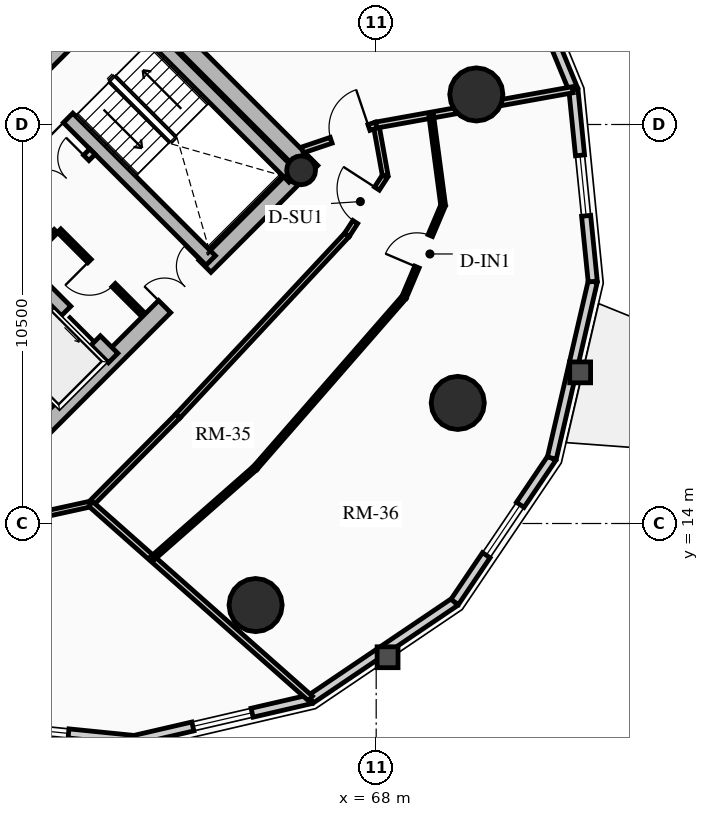
"""IFC4 building model, lengths in metres.
Left out: names, types, materials, properties, quantities, classifications, styles, units other than length and angle.
Written with IfcOpenShell. Run it as: python <this file> out.ifc"""

import sys

from ifc_helpers import new_model, si_unit, direction, frame, frame_2d, origin, origin_2d, place, context, subcontext, project, spatial, rectangle, circle, hollow_circle, extrude, source, transform, mapped, element, fill, save


model = new_model("IFC4")
c1 = context("Model", 3, precision=1e-05, world=origin(), true_north=direction((0.0, 1.0)))
c2 = subcontext(c1, "Body", "Model", "MODEL_VIEW")
j1 = project(units=[si_unit("LENGTHUNIT", "METRE"), si_unit("PLANEANGLEUNIT", "RADIAN")], contexts=[c1])
p1 = place(None, origin())
s1 = spatial("IfcSite", under=j1, at=p1, CompositionType="ELEMENT")
p2 = place(p1, origin())
s2 = spatial("IfcBuilding", under=s1, at=p2, CompositionType="ELEMENT")
p3 = place(p2, frame((0.0, 0.0, 144.04)))
s3 = spatial("IfcBuildingStorey", under=s2, at=p3, CompositionType="ELEMENT", Elevation=144.04)
p4 = place(p3, frame((66.303, 23.263, 0.0), z_axis=(0.0, 0.0, 1.0), x_axis=(-0.707106781187, 0.707106781187, 0.0)))
e1 = element("IfcWall", 1, at=p4, inside=s3, PredefinedType="SHEAR", context=c2, shape_type="SweptSolid", body=[
    extrude(rectangle(XDim=14.2, YDim=0.45, at=frame_2d((7.1, 0.0))), origin(), (0.0, 0.0, 1.0), 3.06),
])
p5 = place(p3, frame((58.578, 15.856, 0.0), z_axis=(0.0, 0.0, 1.0), x_axis=(0.707106781187, 0.707106781187, 0.0)))
e2 = element("IfcWall", 2, at=p5, inside=s3, PredefinedType="SHEAR", context=c2, shape_type="SweptSolid", body=[
    extrude(rectangle(XDim=10.7, YDim=0.45, at=frame_2d((5.35, 0.0))), origin(), (0.0, 0.0, 1.0), 3.06),
])
m1 = source(origin(), c2, "Body", "SweptSolid", [
    extrude(rectangle(XDim=1.5, YDim=2.02, at=frame_2d((0.75, 1.01))), frame((0.0, 0.235, 0.0), z_axis=(0.0, -1.0, 0.0), x_axis=(1.0, 0.0, 0.0)), (0.0, 0.0, 1.0), 0.47),
])
p6 = place(p5, frame((5.45, 0.0, 0.0)))
e3 = element("IfcOpeningElement", 3, at=p6, cuts=e2, PredefinedType="OPENING", context=c2, shape_type="MappedRepresentation", body=[
    mapped(m1, transform((0.0, 0.0, 0.0), x_axis=(1.0, 0.0, 0.0), y_axis=(0.0, 1.0, 0.0), z_axis=(0.0, 0.0, 1.0), scale=1.0)),
])
p7 = place(p3, frame((61.078, 18.355, 0.0), z_axis=(0.0, 0.0, 1.0), x_axis=(-0.707106781187, 0.707106781187, 0.0)))
e4 = element("IfcWall", 4, at=p7, inside=s3, PredefinedType="SHEAR", context=c2, shape_type="SweptSolid", body=[
    extrude(rectangle(XDim=13.75, YDim=0.35, at=frame_2d((6.875, 0.0))), origin(), (0.0, 0.0, 1.0), 3.06),
])
m2 = source(origin(), c2, "Body", "SweptSolid", [
    extrude(rectangle(XDim=1.1, YDim=2.015, at=frame_2d((0.55, 1.007))), frame((0.0, 0.185, 0.0), z_axis=(0.0, -1.0, 0.0), x_axis=(1.0, 0.0, 0.0)), (0.0, 0.0, 1.0), 0.37),
])
p8 = place(p7, frame((4.875, 0.0, 0.0)))
e5 = element("IfcOpeningElement", 5, at=p8, cuts=e4, PredefinedType="OPENING", context=c2, shape_type="MappedRepresentation", body=[
    mapped(m2, transform((0.0, 0.0, 0.0), x_axis=(1.0, 0.0, 0.0), y_axis=(0.0, 1.0, 0.0), z_axis=(0.0, 0.0, 1.0), scale=1.0)),
])
p9 = place(p7, frame((0.65, 0.0, 0.0)))
e6 = element("IfcOpeningElement", 6, at=p9, cuts=e4, PredefinedType="OPENING", context=c2, shape_type="MappedRepresentation", body=[
    mapped(m2, transform((0.0, 0.0, 0.0), x_axis=(1.0, 0.0, 0.0), y_axis=(0.0, 1.0, 0.0), z_axis=(0.0, 0.0, 1.0), scale=1.0)),
])
p10 = place(p7, frame((2.65, 0.0, 0.0)))
e7 = element("IfcOpeningElement", 7, at=p10, cuts=e4, PredefinedType="OPENING", context=c2, shape_type="MappedRepresentation", body=[
    mapped(m2, transform((0.0, 0.0, 0.0), x_axis=(1.0, 0.0, 0.0), y_axis=(0.0, 1.0, 0.0), z_axis=(0.0, 0.0, 1.0), scale=1.0)),
])
m3 = source(origin(), c2, "Body", "SweptSolid", [
    extrude(rectangle(XDim=1.15, YDim=2.02, at=frame_2d((0.575, 1.01))), frame((0.0, 0.185, 0.0), z_axis=(0.0, -1.0, 0.0), x_axis=(1.0, 0.0, 0.0)), (0.0, 0.0, 1.0), 0.37),
])
p11 = place(p7, frame((7.295, 0.0, 0.0)))
e8 = element("IfcOpeningElement", 8, at=p11, cuts=e4, PredefinedType="OPENING", context=c2, shape_type="MappedRepresentation", body=[
    mapped(m3, transform((0.0, 0.0, 0.0), x_axis=(1.0, 0.0, 0.0), y_axis=(0.0, 1.0, 0.0), z_axis=(0.0, 0.0, 1.0), scale=1.0)),
])
p12 = place(p3, frame((63.645, 20.922, 0.0), z_axis=(0.0, 0.0, 1.0), x_axis=(-0.70711946392, 0.707094098226, 0.0)))
e9 = element("IfcWall", 9, at=p12, inside=s3, PredefinedType="SHEAR", context=c2, shape_type="SweptSolid", body=[
    extrude(rectangle(XDim=9.625, YDim=0.35, at=frame_2d((4.812, 0.0))), origin(), (0.0, 0.0, 1.0), 3.06),
])
p13 = place(p12, frame((5.305, 0.0, 0.0)))
e10 = element("IfcOpeningElement", 10, at=p13, cuts=e9, PredefinedType="OPENING", context=c2, shape_type="MappedRepresentation", body=[
    mapped(m3, transform((0.0, 0.0, 0.0), x_axis=(1.0, 0.0, 0.0), y_axis=(0.0, 1.0, 0.0), z_axis=(0.0, 0.0, 1.0), scale=1.0)),
])
p14 = place(p3, frame((65.83, 23.107, 0.0), z_axis=(0.0, 0.0, 1.0), x_axis=(-0.707088616009, 0.707124945897, 0.0)))
e11 = element("IfcWall", 11, at=p14, inside=s3, PredefinedType="SHEAR", context=c2, shape_type="SweptSolid", body=[
    extrude(rectangle(XDim=6.72, YDim=0.35, at=frame_2d((3.36, 0.0))), origin(), (0.0, 0.0, 1.0), 3.06),
])
p15 = place(p3, frame((58.893, 25.674, 0.0), z_axis=(0.0, 0.0, 1.0), x_axis=(0.707106781187, 0.707106781187, 0.0)))
e12 = element("IfcWall", 12, at=p15, inside=s3, PredefinedType="SHEAR", context=c2, shape_type="SweptSolid", body=[
    extrude(rectangle(XDim=3.285, YDim=0.35, at=frame_2d((1.643, 0.0))), origin(), (0.0, 0.0, 1.0), 3.06),
])
p16 = place(p3, frame((66.024, 23.294, 0.0), z_axis=(0.0, 0.0, 1.0), x_axis=(0.707106781187, 0.707106781187, 0.0)))
e13 = element("IfcColumn", 13, at=p16, inside=s3, PredefinedType="COLUMN", context=c2, shape_type="SweptSolid", body=[
    extrude(hollow_circle(Radius=0.38, WallThickness=0.032, at=origin_2d()), origin(), (0.0, 0.0, 1.0), 3.06),
])
for number, where, z_axis, x_axis in (
    (14, (64.827, 11.854, 0.0), (0.0, 0.0, 1.0), (1.0, 0.0, 0.0)),
    (15, (70.146, 17.173, 0.0), (0.0, 0.0, 1.0), (1.0, 0.0, 0.0)),
    (16, (70.635, 25.291, 0.0), (0.0, 0.0, 1.0), (1.0, 0.0, 0.0)),
):
    element("IfcColumn", number, at=place(p3, frame(where, z_axis=z_axis, x_axis=x_axis)), inside=s3, PredefinedType="USERDEFINED", context=c2, shape_type="SweptSolid", body=[
        extrude(circle(Radius=0.7, at=origin_2d()), origin(), (0.0, 0.0, 1.0), 3.06),
    ])
p17 = place(p3, frame((61.633, 8.302, 0.0), z_axis=(0.0, 0.0, 1.0), x_axis=(-0.994959267396, 0.100279889424, 0.0)))
e17 = element("IfcWall", 17, at=p17, inside=s3, PredefinedType="SOLIDWALL", context=c2, shape_type="SweptSolid", body=[
    extrude(rectangle(XDim=5.076, YDim=0.24, at=frame_2d((2.538, 0.0))), origin(), (0.0, 0.0, 1.0), 2.229),
])
m4 = source(origin(), c2, "Body", "SweptSolid", [
    extrude(rectangle(XDim=1.6, YDim=1.3, at=frame_2d((0.8, 0.65))), frame((0.0, 0.13, 0.0), z_axis=(0.0, -1.0, 0.0), x_axis=(1.0, 0.0, 0.0)), (0.0, 0.0, 1.0), 0.26),
])
p18 = place(p17, frame((1.738, 0.0, 0.65)))
e18 = element("IfcOpeningElement", 18, at=p18, cuts=e17, PredefinedType="OPENING", context=c2, shape_type="MappedRepresentation", body=[
    mapped(m4, transform((0.0, 0.0, 0.0), x_axis=(1.0, 0.0, 0.0), y_axis=(0.0, 1.0, 0.0), z_axis=(0.0, 0.0, 1.0), scale=1.0)),
])
p19 = place(p3, frame((66.279, 9.378, 0.0), z_axis=(0.0, 0.0, 1.0), x_axis=(-0.974206226622, -0.225659540039, 0.0)))
e19 = element("IfcWall", 19, at=p19, inside=s3, PredefinedType="SOLIDWALL", context=c2, shape_type="SweptSolid", body=[
    extrude(rectangle(XDim=4.769, YDim=0.24, at=frame_2d((2.385, 0.0))), origin(), (0.0, 0.0, 1.0), 2.229),
])
p20 = place(p19, frame((1.585, 0.0, 0.65)))
e20 = element("IfcOpeningElement", 20, at=p20, cuts=e19, PredefinedType="OPENING", context=c2, shape_type="MappedRepresentation", body=[
    mapped(m4, transform((0.0, 0.0, 0.0), x_axis=(1.0, 0.0, 0.0), y_axis=(0.0, 1.0, 0.0), z_axis=(0.0, 0.0, 1.0), scale=1.0)),
])
p21 = place(p3, frame((70.065, 11.935, 0.0), z_axis=(0.0, 0.0, 1.0), x_axis=(-0.828739009952, -0.559635286042, 0.0)))
e21 = element("IfcWall", 21, at=p21, inside=s3, PredefinedType="SOLIDWALL", context=c2, shape_type="SweptSolid", body=[
    extrude(rectangle(XDim=4.569, YDim=0.24, at=frame_2d((2.284, 0.0))), origin(), (0.0, 0.0, 1.0), 2.229),
])
p22 = place(p3, frame((72.622, 15.721, 0.0), z_axis=(0.0, 0.0, 1.0), x_axis=(-0.559635286042, -0.828739009952, 0.0)))
e22 = element("IfcWall", 22, at=p22, inside=s3, PredefinedType="SOLIDWALL", context=c2, shape_type="SweptSolid", body=[
    extrude(rectangle(XDim=4.569, YDim=0.24, at=frame_2d((2.284, 0.0))), origin(), (0.0, 0.0, 1.0), 2.229),
])
p23 = place(p22, frame((1.484, 0.0, 0.65)))
e23 = element("IfcOpeningElement", 23, at=p23, cuts=e22, PredefinedType="OPENING", context=c2, shape_type="MappedRepresentation", body=[
    mapped(m4, transform((0.0, 0.0, 0.0), x_axis=(1.0, 0.0, 0.0), y_axis=(0.0, 1.0, 0.0), z_axis=(0.0, 0.0, 1.0), scale=1.0)),
])
p24 = place(p3, frame((73.698, 20.367, 0.0), z_axis=(0.0, 0.0, 1.0), x_axis=(-0.225659540039, -0.974206226622, 0.0)))
e24 = element("IfcWall", 24, at=p24, inside=s3, PredefinedType="SOLIDWALL", context=c2, shape_type="SweptSolid", body=[
    extrude(rectangle(XDim=4.769, YDim=0.24, at=frame_2d((2.385, 0.0))), origin(), (0.0, 0.0, 1.0), 2.229),
])
p25 = place(p3, frame((73.189, 25.418, 0.0), z_axis=(0.0, 0.0, 1.0), x_axis=(0.100279889424, -0.994959267396, 0.0)))
e25 = element("IfcWall", 25, at=p25, inside=s3, PredefinedType="SOLIDWALL", context=c2, shape_type="SweptSolid", body=[
    extrude(rectangle(XDim=5.076, YDim=0.24, at=frame_2d((2.538, 0.0))), origin(), (0.0, 0.0, 1.0), 2.229),
])
p26 = place(p25, frame((1.738, 0.0, 0.65)))
e26 = element("IfcOpeningElement", 26, at=p26, cuts=e25, PredefinedType="OPENING", context=c2, shape_type="MappedRepresentation", body=[
    mapped(m4, transform((0.0, 0.0, 0.0), x_axis=(1.0, 0.0, 0.0), y_axis=(0.0, 1.0, 0.0), z_axis=(0.0, 0.0, 1.0), scale=1.0)),
])
p27 = place(p3, frame((71.144, 30.378, 0.0), z_axis=(0.0, 0.0, 1.0), x_axis=(0.38111364655, -0.924528197738, 0.0)))
e27 = element("IfcWall", 27, at=p27, inside=s3, PredefinedType="SOLIDWALL", context=c2, shape_type="SweptSolid", body=[
    extrude(rectangle(XDim=5.366, YDim=0.24, at=frame_2d((2.683, 0.0))), origin(), (0.0, 0.0, 1.0), 2.229),
])
p28 = place(p3, frame((58.214, 21.467, 0.0), z_axis=(0.0, 0.0, 1.0), x_axis=(0.707106781187, 0.707106781187, 0.0)))
e28 = element("IfcWall", 28, at=p28, inside=s3, PredefinedType="PARTITIONING", context=c2, shape_type="SweptSolid", body=[
    extrude(rectangle(XDim=3.28, YDim=0.2, at=frame_2d((1.64, 0.0))), origin(), (0.0, 0.0, 1.0), 2.705),
])
m5 = source(origin(), c2, "Body", "SweptSolid", [
    extrude(rectangle(XDim=1.5, YDim=2.02, at=frame_2d((0.75, 1.01))), frame((0.0, 0.11, 0.0), z_axis=(0.0, -1.0, 0.0), x_axis=(1.0, 0.0, 0.0)), (0.0, 0.0, 1.0), 0.22),
])
p29 = place(p28, frame((1.55, 0.0, 0.0)))
e29 = element("IfcOpeningElement", 29, at=p29, cuts=e28, PredefinedType="OPENING", context=c2, shape_type="MappedRepresentation", body=[
    mapped(m5, transform((0.0, 0.0, 0.0), x_axis=(1.0, 0.0, 0.0), y_axis=(0.0, 1.0, 0.0), z_axis=(0.0, 0.0, 1.0), scale=1.0)),
])
p30 = place(p3, frame((61.835, 19.529, 0.0), z_axis=(0.0, 0.0, 1.0), x_axis=(-0.707146413884, 0.707067146267, 0.0)))
e30 = element("IfcWall", 30, at=p30, inside=s3, PredefinedType="PARTITIONING", context=c2, shape_type="SweptSolid", body=[
    extrude(rectangle(XDim=3.08, YDim=0.125, at=frame_2d((1.54, 0.0))), origin(), (0.0, 0.0, 1.0), 2.705),
])
m6 = source(origin(), c2, "Body", "SweptSolid", [
    extrude(rectangle(XDim=0.9, YDim=2.005, at=frame_2d((0.45, 1.002))), frame((0.0, 0.073, 0.0), z_axis=(0.0, -1.0, 0.0), x_axis=(1.0, 0.0, 0.0)), (0.0, 0.0, 1.0), 0.145),
])
p31 = place(p30, frame((1.05, 0.0, 0.0)))
e31 = element("IfcOpeningElement", 31, at=p31, cuts=e30, PredefinedType="OPENING", context=c2, shape_type="MappedRepresentation", body=[
    mapped(m6, transform((0.0, 0.0, 0.0), x_axis=(1.0, 0.0, 0.0), y_axis=(0.0, 1.0, 0.0), z_axis=(0.0, 0.0, 1.0), scale=1.0)),
])
p32 = place(p3, frame((58.794, 20.915, 0.0), z_axis=(0.0, 0.0, 1.0), x_axis=(0.707106781187, 0.707106781187, 0.0)))
e32 = element("IfcWall", 32, at=p32, inside=s3, PredefinedType="PARTITIONING", context=c2, shape_type="SweptSolid", body=[
    extrude(rectangle(XDim=1.1, YDim=0.125, at=frame_2d((0.55, 0.0))), origin(), (0.0, 0.0, 1.0), 2.705),
])
p33 = place(p3, frame((58.963, 14.18, 0.0), z_axis=(0.0, 0.0, 1.0), x_axis=(0.976826524015, 0.214032572243, 0.0)))
e33 = element("IfcWall", 33, at=p33, inside=s3, PredefinedType="PARTITIONING", context=c2, shape_type="SweptSolid", body=[
    extrude(rectangle(XDim=1.562, YDim=0.15, at=frame_2d((0.781, 0.0))), origin(), (0.0, 0.0, 1.0), 2.275),
])
p34 = place(p3, frame((60.488, 14.514, 0.0), z_axis=(0.0, 0.0, 1.0), x_axis=(0.703880260405, 0.71031864611, 0.0)))
e34 = element("IfcWall", 34, at=p34, inside=s3, PredefinedType="PARTITIONING", context=c2, shape_type="SweptSolid", body=[
    extrude(rectangle(XDim=3.261, YDim=0.15, at=frame_2d((1.63, 0.0))), origin(), (0.0, 0.0, 1.0), 2.275),
])
p35 = place(p3, frame((62.784, 16.83, 0.0), z_axis=(0.0, 0.0, 1.0), x_axis=(0.682240832942, 0.731127516831, 0.0)))
e35 = element("IfcWall", 35, at=p35, inside=s3, PredefinedType="PARTITIONING", context=c2, shape_type="SweptSolid", body=[
    extrude(rectangle(XDim=6.517, YDim=0.15, at=frame_2d((3.259, 0.0))), origin(), (0.0, 0.0, 1.0), 2.275),
])
p36 = place(p3, frame((67.23, 21.595, 0.0), z_axis=(0.0, 0.0, 1.0), x_axis=(0.543687770222, 0.839287560084, 0.0)))
e36 = element("IfcWall", 36, at=p36, inside=s3, PredefinedType="PARTITIONING", context=c2, shape_type="SweptSolid", body=[
    extrude(rectangle(XDim=1.855, YDim=0.15, at=frame_2d((0.927, 0.0))), origin(), (0.0, 0.0, 1.0), 2.275),
])
m7 = source(origin(), c2, "Body", "SweptSolid", [
    extrude(rectangle(XDim=1.05, YDim=2.015, at=frame_2d((0.525, 1.007))), frame((0.0, 0.085, 0.0), z_axis=(0.0, -1.0, 0.0), x_axis=(1.0, 0.0, 0.0)), (0.0, 0.0, 1.0), 0.17),
])
p37 = place(p36, frame((0.402, 0.0, 0.0)))
e37 = element("IfcOpeningElement", 37, at=p37, cuts=e36, PredefinedType="OPENING", context=c2, shape_type="MappedRepresentation", body=[
    mapped(m7, transform((0.0, 0.0, 0.0), x_axis=(1.0, 0.0, 0.0), y_axis=(0.0, 1.0, 0.0), z_axis=(0.0, 0.0, 1.0), scale=1.0)),
])
p38 = place(p3, frame((68.239, 23.152, 0.0), z_axis=(0.0, 0.0, 1.0), x_axis=(-0.177076146115, 0.984197154272, 0.0)))
e38 = element("IfcWall", 38, at=p38, inside=s3, PredefinedType="PARTITIONING", context=c2, shape_type="SweptSolid", body=[
    extrude(rectangle(XDim=1.354, YDim=0.15, at=frame_2d((0.677, 0.0))), origin(), (0.0, 0.0, 1.0), 2.275),
])
p39 = place(p3, frame((60.488, 14.514, 0.0), z_axis=(0.0, 0.0, 1.0), x_axis=(0.748740614849, -0.662863101761, 0.0)))
e39 = element("IfcWall", 39, at=p39, inside=s3, PredefinedType="PARTITIONING", context=c2, shape_type="SweptSolid", body=[
    extrude(rectangle(XDim=7.721, YDim=0.16, at=frame_2d((3.861, 0.0))), origin(), (0.0, 0.0, 1.0), 2.229),
])
p40 = place(p3, frame((67.999, 24.485, 0.0), z_axis=(0.0, 0.0, 1.0), x_axis=(0.984209402602, 0.177008055834, 0.0)))
e40 = element("IfcWall", 40, at=p40, inside=s3, PredefinedType="PARTITIONING", context=c2, shape_type="SweptSolid", body=[
    extrude(rectangle(XDim=5.254, YDim=0.16, at=frame_2d((2.627, 0.0))), origin(), (0.0, 0.0, 1.0), 2.229),
])
p41 = place(p3, frame((66.056, 23.828, 0.0), z_axis=(0.0, 0.0, 1.0), x_axis=(0.947377696447, 0.320117947442, 0.0)))
e41 = element("IfcWall", 41, at=p41, inside=s3, PredefinedType="PARTITIONING", context=c2, shape_type="SweptSolid", body=[
    extrude(rectangle(XDim=2.051, YDim=0.16, at=frame_2d((1.025, 0.0))), origin(), (0.0, 0.0, 1.0), 2.275),
])
m8 = source(origin(), c2, "Body", "SweptSolid", [
    extrude(rectangle(XDim=1.05, YDim=2.015, at=frame_2d((0.525, 1.007))), frame((0.0, 0.09, 0.0), z_axis=(0.0, -1.0, 0.0), x_axis=(1.0, 0.0, 0.0)), (0.0, 0.0, 1.0), 0.18),
])
p42 = place(p41, frame((0.801, 0.0, 0.0)))
e42 = element("IfcOpeningElement", 42, at=p42, cuts=e41, PredefinedType="OPENING", context=c2, shape_type="MappedRepresentation", body=[
    mapped(m8, transform((0.0, 0.0, 0.0), x_axis=(1.0, 0.0, 0.0), y_axis=(0.0, 1.0, 0.0), z_axis=(0.0, 0.0, 1.0), scale=1.0)),
])
p43 = place(p3, frame((62.107, 13.081, 0.0), z_axis=(0.0, 0.0, 1.0), x_axis=(0.751158800718, 0.660121546462, 0.0)))
e43 = element("IfcWall", 43, at=p43, inside=s3, PredefinedType="PARTITIONING", context=c2, shape_type="SweptSolid", body=[
    extrude(rectangle(XDim=3.61, YDim=0.125, at=frame_2d((1.805, 0.0))), origin(), (0.0, 0.0, 1.0), 2.275),
])
p44 = place(p3, frame((64.819, 15.464, 0.0), z_axis=(0.0, 0.0, 1.0), x_axis=(0.657357859075, 0.75357855935, 0.0)))
e44 = element("IfcWall", 44, at=p44, inside=s3, PredefinedType="PARTITIONING", context=c2, shape_type="SweptSolid", body=[
    extrude(rectangle(XDim=5.958, YDim=0.125, at=frame_2d((2.979, 0.0))), origin(), (0.0, 0.0, 1.0), 2.275),
])
p45 = place(p3, frame((68.735, 19.953, 0.0), z_axis=(0.0, 0.0, 1.0), x_axis=(0.390621397191, 0.920551423907, 0.0)))
e45 = element("IfcWall", 45, at=p45, inside=s3, PredefinedType="PARTITIONING", context=c2, shape_type="SweptSolid", body=[
    extrude(rectangle(XDim=2.629, YDim=0.125, at=frame_2d((1.314, 0.0))), origin(), (0.0, 0.0, 1.0), 2.275),
])
p46 = place(p45, frame((0.865, 0.0, 0.0)))
e46 = element("IfcOpeningElement", 46, at=p46, cuts=e45, PredefinedType="OPENING", context=c2, shape_type="MappedRepresentation", body=[
    mapped(m6, transform((0.0, 0.0, 0.0), x_axis=(1.0, 0.0, 0.0), y_axis=(0.0, 1.0, 0.0), z_axis=(0.0, 0.0, 1.0), scale=1.0)),
])
p47 = place(p3, frame((69.762, 22.373, 0.0), z_axis=(0.0, 0.0, 1.0), x_axis=(-0.131715949278, 0.991287500529, 0.0)))
e47 = element("IfcWall", 47, at=p47, inside=s3, PredefinedType="PARTITIONING", context=c2, shape_type="SweptSolid", body=[
    extrude(rectangle(XDim=2.393, YDim=0.125, at=frame_2d((1.196, 0.0))), origin(), (0.0, 0.0, 1.0), 2.275),
])
m9 = source(origin(), c2, "Body", "SweptSolid", [
    extrude(rectangle(XDim=1.6, YDim=1.3, at=frame_2d((0.8, 0.65))), frame((0.0, 0.03, 0.0), z_axis=(0.0, -1.0, 0.0), x_axis=(1.0, 0.0, 0.0)), (0.0, 0.0, 1.0), 0.06),
])
p48 = place(p18, origin())
e48 = element("IfcWindow", 48, at=p48, inside=s3, PartitioningType="SINGLE_PANEL", PredefinedType="WINDOW", context=c2, shape_type="MappedRepresentation", body=[
    mapped(m9, transform((0.0, 0.0, 0.0), x_axis=(1.0, 0.0, 0.0), y_axis=(0.0, 1.0, 0.0), z_axis=(0.0, 0.0, 1.0), scale=1.0)),
])
fill(e18, e48)
p49 = place(p20, origin())
e49 = element("IfcWindow", 49, at=p49, inside=s3, PartitioningType="SINGLE_PANEL", PredefinedType="WINDOW", context=c2, shape_type="MappedRepresentation", body=[
    mapped(m9, transform((0.0, 0.0, 0.0), x_axis=(1.0, 0.0, 0.0), y_axis=(0.0, 1.0, 0.0), z_axis=(0.0, 0.0, 1.0), scale=1.0)),
])
fill(e20, e49)
p50 = place(p23, origin())
e50 = element("IfcWindow", 50, at=p50, inside=s3, PartitioningType="SINGLE_PANEL", PredefinedType="WINDOW", context=c2, shape_type="MappedRepresentation", body=[
    mapped(m9, transform((0.0, 0.0, 0.0), x_axis=(1.0, 0.0, 0.0), y_axis=(0.0, 1.0, 0.0), z_axis=(0.0, 0.0, 1.0), scale=1.0)),
])
fill(e23, e50)
p51 = place(p26, origin())
e51 = element("IfcWindow", 51, at=p51, inside=s3, PartitioningType="SINGLE_PANEL", PredefinedType="WINDOW", context=c2, shape_type="MappedRepresentation", body=[
    mapped(m9, transform((0.0, 0.0, 0.0), x_axis=(1.0, 0.0, 0.0), y_axis=(0.0, 1.0, 0.0), z_axis=(0.0, 0.0, 1.0), scale=1.0)),
])
fill(e26, e51)
m10 = source(origin(), c2, "Body", "SweptSolid", [
    extrude(rectangle(XDim=1.1, YDim=2.015, at=frame_2d((0.55, 1.007))), frame((0.0, 0.025, 0.0), z_axis=(0.0, -1.0, 0.0), x_axis=(1.0, 0.0, 0.0)), (0.0, 0.0, 1.0), 0.05),
])
p52 = place(p9, origin())
e52 = element("IfcDoor", 52, at=p52, inside=s3, OperationType="SLIDING_TO_LEFT", PredefinedType="DOOR", context=c2, shape_type="MappedRepresentation", body=[
    mapped(m10, transform((0.0, 0.0, 0.0), x_axis=(1.0, 0.0, 0.0), y_axis=(0.0, 1.0, 0.0), z_axis=(0.0, 0.0, 1.0), scale=1.0)),
])
fill(e6, e52)
m11 = source(origin(), c2, "Body", "SweptSolid", [
    extrude(rectangle(XDim=1.15, YDim=2.02, at=frame_2d((0.575, 1.01))), frame((0.0, 0.025, 0.0), z_axis=(0.0, -1.0, 0.0), x_axis=(1.0, 0.0, 0.0)), (0.0, 0.0, 1.0), 0.05),
])
p53 = place(p13, origin())
e53 = element("IfcDoor", 53, at=p53, inside=s3, OperationType="SINGLE_SWING_LEFT", PredefinedType="DOOR", context=c2, shape_type="MappedRepresentation", body=[
    mapped(m11, transform((0.0, 0.0, 0.0), x_axis=(1.0, 0.0, 0.0), y_axis=(0.0, 1.0, 0.0), z_axis=(0.0, 0.0, 1.0), scale=1.0)),
])
fill(e10, e53)
m12 = source(origin(), c2, "Body", "SweptSolid", [
    extrude(rectangle(XDim=1.5, YDim=2.02, at=frame_2d((0.75, 1.01))), frame((0.0, 0.025, 0.0), z_axis=(0.0, -1.0, 0.0), x_axis=(1.0, 0.0, 0.0)), (0.0, 0.0, 1.0), 0.05),
])
p54 = place(p6, origin())
e54 = element("IfcDoor", 54, at=p54, inside=s3, OperationType="DOUBLE_DOOR_SINGLE_SWING", PredefinedType="DOOR", context=c2, shape_type="MappedRepresentation", body=[
    mapped(m12, transform((0.0, 0.0, 0.0), x_axis=(1.0, 0.0, 0.0), y_axis=(0.0, 1.0, 0.0), z_axis=(0.0, 0.0, 1.0), scale=1.0)),
])
fill(e3, e54)
p55 = place(p29, origin())
e55 = element("IfcDoor", 55, at=p55, inside=s3, OperationType="DOUBLE_DOOR_SINGLE_SWING", PredefinedType="DOOR", context=c2, shape_type="MappedRepresentation", body=[
    mapped(m12, transform((0.0, 0.0, 0.0), x_axis=(1.0, 0.0, 0.0), y_axis=(0.0, 1.0, 0.0), z_axis=(0.0, 0.0, 1.0), scale=1.0)),
])
fill(e29, e55)
m13 = source(origin(), c2, "Body", "SweptSolid", [
    extrude(rectangle(XDim=0.9, YDim=2.005, at=frame_2d((0.45, 1.002))), frame((0.0, 0.025, 0.0), z_axis=(0.0, -1.0, 0.0), x_axis=(1.0, 0.0, 0.0)), (0.0, 0.0, 1.0), 0.05),
])
p56 = place(p31, origin())
e56 = element("IfcDoor", 56, at=p56, inside=s3, OperationType="SINGLE_SWING_RIGHT", PredefinedType="DOOR", context=c2, shape_type="MappedRepresentation", body=[
    mapped(m13, transform((0.0, 0.0, 0.0), x_axis=(1.0, 0.0, 0.0), y_axis=(0.0, 1.0, 0.0), z_axis=(0.0, 0.0, 1.0), scale=1.0)),
])
fill(e31, e56)
m14 = source(origin(), c2, "Body", "SweptSolid", [
    extrude(rectangle(XDim=1.05, YDim=2.015, at=frame_2d((0.525, 1.007))), frame((0.0, 0.025, 0.0), z_axis=(0.0, -1.0, 0.0), x_axis=(1.0, 0.0, 0.0)), (0.0, 0.0, 1.0), 0.05),
])
p57 = place(p42, origin())
e57 = element("IfcDoor", 57, at=p57, inside=s3, OperationType="SINGLE_SWING_RIGHT", PredefinedType="DOOR", context=c2, shape_type="MappedRepresentation", body=[
    mapped(m14, transform((0.0, 0.0, 0.0), x_axis=(1.0, 0.0, 0.0), y_axis=(0.0, 1.0, 0.0), z_axis=(0.0, 0.0, 1.0), scale=1.0)),
])
fill(e42, e57)
p58 = place(p37, origin())
e58 = element("IfcDoor", 58, at=p58, inside=s3, OperationType="SINGLE_SWING_RIGHT", PredefinedType="DOOR", context=c2, shape_type="MappedRepresentation", body=[
    mapped(m14, transform((0.0, 0.0, 0.0), x_axis=(1.0, 0.0, 0.0), y_axis=(0.0, 1.0, 0.0), z_axis=(0.0, 0.0, 1.0), scale=1.0)),
])
fill(e37, e58)
p59 = place(p46, origin())
e59 = element("IfcDoor", 59, at=p59, inside=s3, OperationType="SINGLE_SWING_LEFT", PredefinedType="DOOR", context=c2, shape_type="MappedRepresentation", body=[
    mapped(m13, transform((0.0, 0.0, 0.0), x_axis=(1.0, 0.0, 0.0), y_axis=(0.0, 1.0, 0.0), z_axis=(0.0, 0.0, 1.0), scale=1.0)),
])
fill(e46, e59)
save(model, sys.argv[1])
